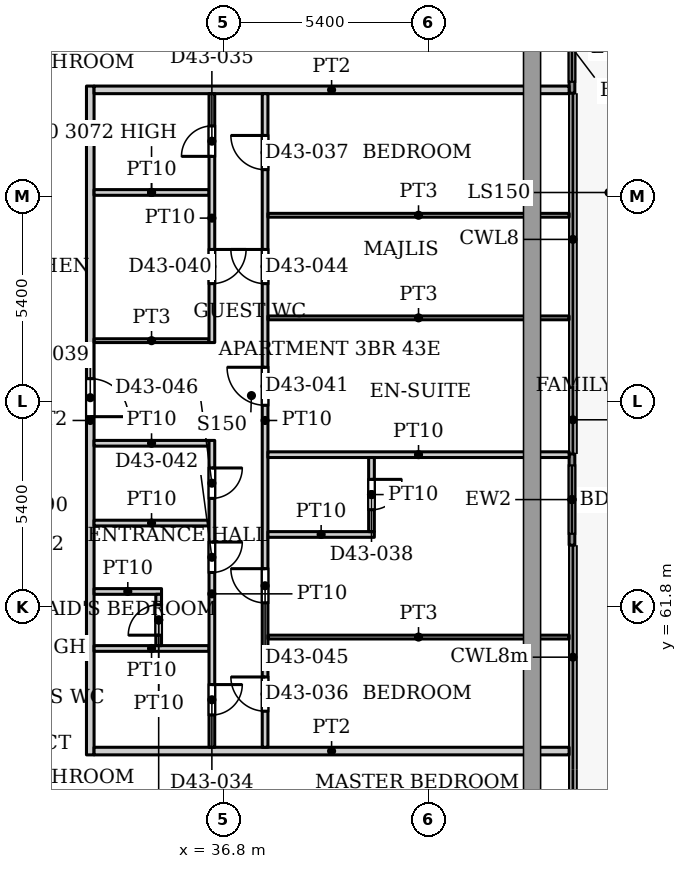
"""IFC4 building model, lengths in metres.
Left out: names, types, materials, properties, quantities, classifications, styles, units other than length and angle.
Written with IfcOpenShell. Run it as: python <this file> out.ifc"""

import sys

from ifc_helpers import new_model, si_unit, direction, frame, frame_2d, origin, place, context, subcontext, project, spatial, rectangle, extrude, source, transform, mapped, element, fill, save


model = new_model("IFC4")
c1 = context("Model", 3, precision=1e-05, world=origin(), true_north=direction((0.0, 1.0)))
c2 = subcontext(c1, "Body", "Model", "MODEL_VIEW")
j1 = project(units=[si_unit("LENGTHUNIT", "METRE"), si_unit("PLANEANGLEUNIT", "RADIAN")], contexts=[c1])
p1 = place(None, origin())
s1 = spatial("IfcSite", under=j1, at=p1, CompositionType="ELEMENT")
p2 = place(p1, origin())
s2 = spatial("IfcBuilding", under=s1, at=p2, CompositionType="ELEMENT")
p3 = place(p2, frame((0.0, 0.0, 183.8)))
s3 = spatial("IfcBuildingStorey", under=s2, at=p3, CompositionType="ELEMENT", Elevation=183.8)
p4 = place(p3, frame((45.975, 77.712, 0.0), z_axis=(0.0, 0.0, 1.0), x_axis=(0.0, -1.0, 0.0)))
e1 = element("IfcWall", 1, at=p4, inside=s3, PredefinedType="SOLIDWALL", context=c2, shape_type="SweptSolid", body=[
    extrude(rectangle(XDim=2.4, YDim=0.15, at=frame_2d((1.2, 0.0))), origin(), (0.0, 0.0, 1.0), 3.75),
])
p5 = place(p4, frame((0.3, 0.0, 0.0)))
e2 = element("IfcOpeningElement", 2, at=p5, cuts=e1, PredefinedType="OPENING", context=c2, shape_type="SweptSolid", body=[
    extrude(rectangle(XDim=1.8, YDim=2.4, at=frame_2d((0.9, 1.2))), frame((0.0, 0.085, 0.0), z_axis=(0.0, -1.0, 0.0), x_axis=(1.0, 0.0, 0.0)), (0.0, 0.0, 1.0), 0.17),
])
p6 = place(p3, frame((45.975, 65.818, 0.0), z_axis=(0.0, 0.0, 1.0), x_axis=(0.0, -1.0, 0.0)))
e3 = element("IfcWall", 3, at=p6, inside=s3, PredefinedType="SOLIDWALL", context=c2, shape_type="SweptSolid", body=[
    extrude(rectangle(XDim=2.4, YDim=0.15, at=frame_2d((1.2, 0.0))), origin(), (0.0, 0.0, 1.0), 3.75),
])
p7 = place(p6, frame((0.3, 0.0, 0.0)))
e4 = element("IfcOpeningElement", 4, at=p7, cuts=e3, PredefinedType="OPENING", context=c2, shape_type="SweptSolid", body=[
    extrude(rectangle(XDim=1.8, YDim=2.4, at=frame_2d((0.9, 1.2))), frame((0.0, 0.085, 0.0), z_axis=(0.0, -1.0, 0.0), x_axis=(1.0, 0.0, 0.0)), (0.0, 0.0, 1.0), 0.17),
])
p8 = place(p3, frame((33.3, 57.9, 0.0), z_axis=(0.0, 0.0, 1.0), x_axis=(0.0, 1.0, 0.0)))
e5 = element("IfcWall", 5, at=p8, inside=s3, PredefinedType="PARTITIONING", context=c2, shape_type="SweptSolid", body=[
    extrude(rectangle(XDim=17.6, YDim=0.2, at=frame_2d((8.8, 0.0))), origin(), (0.0, 0.0, 1.0), 3.6),
])
p9 = place(p8, frame((8.9, 0.0, 0.0)))
e6 = element("IfcOpeningElement", 6, at=p9, cuts=e5, PredefinedType="OPENING", context=c2, shape_type="SweptSolid", body=[
    extrude(rectangle(XDim=1.0, YDim=2.1, at=frame_2d((0.5, 1.05))), frame((0.0, 0.11, 0.0), z_axis=(0.0, -1.0, 0.0), x_axis=(1.0, 0.0, 0.0)), (0.0, 0.0, 1.0), 0.22),
])
p10 = place(p3, frame((33.4, 58.0, 0.0), z_axis=(0.0, 0.0, 1.0), x_axis=(1.0, 0.0, 0.0)))
e7 = element("IfcWall", 7, at=p10, inside=s3, PredefinedType="PARTITIONING", context=c2, shape_type="SweptSolid", body=[
    extrude(rectangle(XDim=12.5, YDim=0.2, at=frame_2d((6.25, 0.0))), origin(), (0.0, 0.0, 1.0), 3.6),
])
p11 = place(p3, frame((33.4, 60.7, 0.0), z_axis=(0.0, 0.0, 1.0), x_axis=(1.0, 0.0, 0.0)))
e8 = element("IfcWall", 8, at=p11, inside=s3, PredefinedType="PARTITIONING", context=c2, shape_type="SweptSolid", body=[
    extrude(rectangle(XDim=3.025, YDim=0.15, at=frame_2d((1.513, 0.0))), origin(), (0.0, 0.0, 1.0), 3.6),
])
p12 = place(p3, frame((33.4, 62.2, 0.0), z_axis=(0.0, 0.0, 1.0), x_axis=(1.0, 0.0, 0.0)))
e9 = element("IfcWall", 9, at=p12, inside=s3, PredefinedType="PARTITIONING", context=c2, shape_type="SweptSolid", body=[
    extrude(rectangle(XDim=1.775, YDim=0.15, at=frame_2d((0.888, 0.0))), origin(), (0.0, 0.0, 1.0), 3.6),
])
for number, where, z_axis, x_axis in (
    (10, (33.4, 64.0, 0.0), (0.0, 0.0, 1.0), (1.0, 0.0, 0.0)),
    (11, (33.4, 66.1, 0.0), (0.0, 0.0, 1.0), (1.0, 0.0, 0.0)),
):
    element("IfcWall", number, at=place(p3, frame(where, z_axis=z_axis, x_axis=x_axis)), inside=s3, PredefinedType="PARTITIONING", context=c2, shape_type="SweptSolid", body=[
        extrude(rectangle(XDim=3.025, YDim=0.15, at=frame_2d((1.513, 0.0))), origin(), (0.0, 0.0, 1.0), 3.6),
    ])
p13 = place(p3, frame((33.4, 68.8, 0.0), z_axis=(0.0, 0.0, 1.0), x_axis=(1.0, 0.0, 0.0)))
e12 = element("IfcWall", 12, at=p13, inside=s3, PredefinedType="PARTITIONING", context=c2, shape_type="SweptSolid", body=[
    extrude(rectangle(XDim=3.025, YDim=0.1, at=frame_2d((1.513, 0.0))), origin(), (0.0, 0.0, 1.0), 3.6),
])
p14 = place(p3, frame((33.4, 72.7, 0.0), z_axis=(0.0, 0.0, 1.0), x_axis=(1.0, 0.0, 0.0)))
e13 = element("IfcWall", 13, at=p14, inside=s3, PredefinedType="PARTITIONING", context=c2, shape_type="SweptSolid", body=[
    extrude(rectangle(XDim=3.025, YDim=0.15, at=frame_2d((1.513, 0.0))), origin(), (0.0, 0.0, 1.0), 3.072),
])
p15 = place(p3, frame((33.4, 75.4, 0.0), z_axis=(0.0, 0.0, 1.0), x_axis=(1.0, 0.0, 0.0)))
e14 = element("IfcWall", 14, at=p15, inside=s3, PredefinedType="PARTITIONING", context=c2, shape_type="SweptSolid", body=[
    extrude(rectangle(XDim=12.5, YDim=0.2, at=frame_2d((6.25, 0.0))), origin(), (0.0, 0.0, 1.0), 3.6),
])
p16 = place(p3, frame((35.1, 60.775, 0.0), z_axis=(0.0, 0.0, 1.0), x_axis=(0.0, 1.0, 0.0)))
e15 = element("IfcWall", 15, at=p16, inside=s3, PredefinedType="PARTITIONING", context=c2, shape_type="SweptSolid", body=[
    extrude(rectangle(XDim=1.35, YDim=0.15, at=frame_2d((0.675, 0.0))), origin(), (0.0, 0.0, 1.0), 3.6),
])
p17 = place(p16, frame((0.275, 0.0, 0.0)))
e16 = element("IfcOpeningElement", 16, at=p17, cuts=e15, PredefinedType="OPENING", context=c2, shape_type="SweptSolid", body=[
    extrude(rectangle(XDim=0.8, YDim=2.1, at=frame_2d((0.4, 1.05))), frame((0.0, 0.085, 0.0), z_axis=(0.0, -1.0, 0.0), x_axis=(1.0, 0.0, 0.0)), (0.0, 0.0, 1.0), 0.17),
])
p18 = place(p3, frame((36.5, 58.1, 0.0), z_axis=(0.0, 0.0, 1.0), x_axis=(0.0, 1.0, 0.0)))
e17 = element("IfcWall", 17, at=p18, inside=s3, PredefinedType="PARTITIONING", context=c2, shape_type="SweptSolid", body=[
    extrude(rectangle(XDim=8.075, YDim=0.15, at=frame_2d((4.038, 0.0))), origin(), (0.0, 0.0, 1.0), 3.6),
])
p19 = place(p18, frame((0.85, 0.0, 0.0)))
e18 = element("IfcOpeningElement", 18, at=p19, cuts=e17, PredefinedType="OPENING", context=c2, shape_type="SweptSolid", body=[
    extrude(rectangle(XDim=0.8, YDim=2.1, at=frame_2d((0.4, 1.05))), frame((0.0, 0.085, 0.0), z_axis=(0.0, -1.0, 0.0), x_axis=(1.0, 0.0, 0.0)), (0.0, 0.0, 1.0), 0.17),
])
p20 = place(p18, frame((4.6, 0.0, 0.0)))
e19 = element("IfcOpeningElement", 19, at=p20, cuts=e17, PredefinedType="OPENING", context=c2, shape_type="SweptSolid", body=[
    extrude(rectangle(XDim=0.8, YDim=2.1, at=frame_2d((0.4, 1.05))), frame((0.0, 0.085, 0.0), z_axis=(0.0, -1.0, 0.0), x_axis=(1.0, 0.0, 0.0)), (0.0, 0.0, 1.0), 0.17),
])
p21 = place(p18, frame((6.55, 0.0, 0.0)))
e20 = element("IfcOpeningElement", 20, at=p21, cuts=e17, PredefinedType="OPENING", context=c2, shape_type="SweptSolid", body=[
    extrude(rectangle(XDim=0.8, YDim=2.1, at=frame_2d((0.4, 1.05))), frame((0.0, 0.085, 0.0), z_axis=(0.0, -1.0, 0.0), x_axis=(1.0, 0.0, 0.0)), (0.0, 0.0, 1.0), 0.17),
])
p22 = place(p3, frame((36.5, 68.75, 0.0), z_axis=(0.0, 0.0, 1.0), x_axis=(0.0, 1.0, 0.0)))
e21 = element("IfcWall", 21, at=p22, inside=s3, PredefinedType="PARTITIONING", context=c2, shape_type="SweptSolid", body=[
    extrude(rectangle(XDim=6.55, YDim=0.15, at=frame_2d((3.275, 0.0))), origin(), (0.0, 0.0, 1.0), 3.6),
])
p23 = place(p22, frame((4.9, 0.0, 0.0)))
e22 = element("IfcOpeningElement", 22, at=p23, cuts=e21, PredefinedType="OPENING", context=c2, shape_type="SweptSolid", body=[
    extrude(rectangle(XDim=0.8, YDim=2.1, at=frame_2d((0.4, 1.05))), frame((0.0, 0.085, 0.0), z_axis=(0.0, -1.0, 0.0), x_axis=(1.0, 0.0, 0.0)), (0.0, 0.0, 1.0), 0.17),
])
p24 = place(p22, frame((1.55, 0.0, 0.0)))
e23 = element("IfcOpeningElement", 23, at=p24, cuts=e21, PredefinedType="OPENING", context=c2, shape_type="SweptSolid", body=[
    extrude(rectangle(XDim=0.9, YDim=2.1, at=frame_2d((0.45, 1.05))), frame((0.0, 0.085, 0.0), z_axis=(0.0, -1.0, 0.0), x_axis=(1.0, 0.0, 0.0)), (0.0, 0.0, 1.0), 0.17),
])
p25 = place(p3, frame((37.9, 58.1, 0.0), z_axis=(0.0, 0.0, 1.0), x_axis=(0.0, 1.0, 0.0)))
e24 = element("IfcWall", 24, at=p25, inside=s3, PredefinedType="PARTITIONING", context=c2, shape_type="SweptSolid", body=[
    extrude(rectangle(XDim=17.2, YDim=0.15, at=frame_2d((8.6, 0.0))), origin(), (0.0, 0.0, 1.0), 3.6),
])
p26 = place(p25, frame((0.95, 0.0, 0.0)))
e25 = element("IfcOpeningElement", 25, at=p26, cuts=e24, PredefinedType="OPENING", context=c2, shape_type="SweptSolid", body=[
    extrude(rectangle(XDim=0.9, YDim=2.1, at=frame_2d((0.45, 1.05))), frame((0.0, 0.085, 0.0), z_axis=(0.0, -1.0, 0.0), x_axis=(1.0, 0.0, 0.0)), (0.0, 0.0, 1.0), 0.17),
])
p27 = place(p25, frame((15.2, 0.0, 0.0)))
e26 = element("IfcOpeningElement", 26, at=p27, cuts=e24, PredefinedType="OPENING", context=c2, shape_type="SweptSolid", body=[
    extrude(rectangle(XDim=0.9, YDim=2.1, at=frame_2d((0.45, 1.05))), frame((0.0, 0.085, 0.0), z_axis=(0.0, -1.0, 0.0), x_axis=(1.0, 0.0, 0.0)), (0.0, 0.0, 1.0), 0.17),
])
p28 = place(p25, frame((9.0, 0.0, 0.0)))
e27 = element("IfcOpeningElement", 27, at=p28, cuts=e24, PredefinedType="OPENING", context=c2, shape_type="SweptSolid", body=[
    extrude(rectangle(XDim=1.0, YDim=2.1, at=frame_2d((0.5, 1.05))), frame((0.0, 0.085, 0.0), z_axis=(0.0, -1.0, 0.0), x_axis=(1.0, 0.0, 0.0)), (0.0, 0.0, 1.0), 0.17),
])
p29 = place(p25, frame((12.2, 0.0, 0.0)))
e28 = element("IfcOpeningElement", 28, at=p29, cuts=e24, PredefinedType="OPENING", context=c2, shape_type="SweptSolid", body=[
    extrude(rectangle(XDim=0.9, YDim=2.1, at=frame_2d((0.45, 1.05))), frame((0.0, 0.085, 0.0), z_axis=(0.0, -1.0, 0.0), x_axis=(1.0, 0.0, 0.0)), (0.0, 0.0, 1.0), 0.17),
])
p30 = place(p25, frame((3.8, 0.0, 0.0)))
e29 = element("IfcOpeningElement", 29, at=p30, cuts=e24, PredefinedType="OPENING", context=c2, shape_type="SweptSolid", body=[
    extrude(rectangle(XDim=0.9, YDim=2.1, at=frame_2d((0.45, 1.05))), frame((0.0, 0.085, 0.0), z_axis=(0.0, -1.0, 0.0), x_axis=(1.0, 0.0, 0.0)), (0.0, 0.0, 1.0), 0.17),
])
p31 = place(p3, frame((37.975, 61.0, 0.0), z_axis=(0.0, 0.0, 1.0), x_axis=(1.0, 0.0, 0.0)))
e30 = element("IfcWall", 30, at=p31, inside=s3, PredefinedType="PARTITIONING", context=c2, shape_type="SweptSolid", body=[
    extrude(rectangle(XDim=7.925, YDim=0.1, at=frame_2d((3.962, 0.0))), origin(), (0.0, 0.0, 1.0), 3.6),
])
p32 = place(p3, frame((37.975, 63.7, 0.0), z_axis=(0.0, 0.0, 1.0), x_axis=(1.0, 0.0, 0.0)))
e31 = element("IfcWall", 31, at=p32, inside=s3, PredefinedType="PARTITIONING", context=c2, shape_type="SweptSolid", body=[
    extrude(rectangle(XDim=2.8, YDim=0.15, at=frame_2d((1.4, 0.0))), origin(), (0.0, 0.0, 1.0), 3.6),
])
p33 = place(p3, frame((37.975, 65.8, 0.0), z_axis=(0.0, 0.0, 1.0), x_axis=(1.0, 0.0, 0.0)))
e32 = element("IfcWall", 32, at=p33, inside=s3, PredefinedType="PARTITIONING", context=c2, shape_type="SweptSolid", body=[
    extrude(rectangle(XDim=7.925, YDim=0.15, at=frame_2d((3.962, 0.0))), origin(), (0.0, 0.0, 1.0), 3.6),
])
for number, where, z_axis, x_axis in (
    (33, (37.975, 69.4, 0.0), (0.0, 0.0, 1.0), (1.0, 0.0, 0.0)),
    (34, (37.975, 72.1, 0.0), (0.0, 0.0, 1.0), (1.0, 0.0, 0.0)),
):
    element("IfcWall", number, at=place(p3, frame(where, z_axis=z_axis, x_axis=x_axis)), inside=s3, PredefinedType="PARTITIONING", context=c2, shape_type="SweptSolid", body=[
        extrude(rectangle(XDim=7.925, YDim=0.1, at=frame_2d((3.962, 0.0))), origin(), (0.0, 0.0, 1.0), 3.6),
    ])
p34 = place(p3, frame((40.7, 63.775, 0.0), z_axis=(0.0, 0.0, 1.0), x_axis=(0.0, 1.0, 0.0)))
e35 = element("IfcWall", 35, at=p34, inside=s3, PredefinedType="PARTITIONING", context=c2, shape_type="SweptSolid", body=[
    extrude(rectangle(XDim=1.95, YDim=0.15, at=frame_2d((0.975, 0.0))), origin(), (0.0, 0.0, 1.0), 3.6),
])
p35 = place(p34, frame((0.575, 0.0, 0.0)))
e36 = element("IfcOpeningElement", 36, at=p35, cuts=e35, PredefinedType="OPENING", context=c2, shape_type="SweptSolid", body=[
    extrude(rectangle(XDim=0.8, YDim=2.1, at=frame_2d((0.4, 1.05))), frame((0.0, 0.085, 0.0), z_axis=(0.0, -1.0, 0.0), x_axis=(1.0, 0.0, 0.0)), (0.0, 0.0, 1.0), 0.17),
])
m1 = source(origin(), c2, "Body", "SweptSolid", [
    extrude(rectangle(XDim=1.8, YDim=2.4, at=frame_2d((0.9, 1.2))), frame((0.0, 0.025, 0.0), z_axis=(0.0, -1.0, 0.0), x_axis=(1.0, 0.0, 0.0)), (0.0, 0.0, 1.0), 0.05),
])
p36 = place(p5, origin())
e37 = element("IfcDoor", 37, at=p36, inside=s3, OperationType="SLIDING_TO_LEFT", PredefinedType="DOOR", context=c2, shape_type="MappedRepresentation", body=[
    mapped(m1, transform((0.0, 0.0, 0.0), x_axis=(1.0, 0.0, 0.0), y_axis=(0.0, 1.0, 0.0), z_axis=(0.0, 0.0, 1.0), scale=1.0)),
])
fill(e2, e37)
p37 = place(p7, origin())
e38 = element("IfcDoor", 38, at=p37, inside=s3, OperationType="SLIDING_TO_LEFT", PredefinedType="DOOR", context=c2, shape_type="MappedRepresentation", body=[
    mapped(m1, transform((0.0, 0.0, 0.0), x_axis=(1.0, 0.0, 0.0), y_axis=(0.0, 1.0, 0.0), z_axis=(0.0, 0.0, 1.0), scale=1.0)),
])
fill(e4, e38)
m2 = source(origin(), c2, "Body", "SweptSolid", [
    extrude(rectangle(XDim=0.8, YDim=2.1, at=frame_2d((0.4, 1.05))), frame((0.0, 0.025, 0.0), z_axis=(0.0, -1.0, 0.0), x_axis=(1.0, 0.0, 0.0)), (0.0, 0.0, 1.0), 0.05),
])
p38 = place(p19, origin())
e39 = element("IfcDoor", 39, at=p38, inside=s3, OperationType="SINGLE_SWING_RIGHT", PredefinedType="DOOR", context=c2, shape_type="MappedRepresentation", body=[
    mapped(m2, transform((0.0, 0.0, 0.0), x_axis=(1.0, 0.0, 0.0), y_axis=(0.0, 1.0, 0.0), z_axis=(0.0, 0.0, 1.0), scale=1.0)),
])
fill(e18, e39)
p39 = place(p23, origin())
e40 = element("IfcDoor", 40, at=p39, inside=s3, OperationType="SINGLE_SWING_LEFT", PredefinedType="DOOR", context=c2, shape_type="MappedRepresentation", body=[
    mapped(m2, transform((0.0, 0.0, 0.0), x_axis=(1.0, 0.0, 0.0), y_axis=(0.0, 1.0, 0.0), z_axis=(0.0, 0.0, 1.0), scale=1.0)),
])
fill(e22, e40)
m3 = source(origin(), c2, "Body", "SweptSolid", [
    extrude(rectangle(XDim=0.9, YDim=2.1, at=frame_2d((0.45, 1.05))), frame((0.0, 0.025, 0.0), z_axis=(0.0, -1.0, 0.0), x_axis=(1.0, 0.0, 0.0)), (0.0, 0.0, 1.0), 0.05),
])
p40 = place(p26, origin())
e41 = element("IfcDoor", 41, at=p40, inside=s3, OperationType="SINGLE_SWING_LEFT", PredefinedType="DOOR", context=c2, shape_type="MappedRepresentation", body=[
    mapped(m3, transform((0.0, 0.0, 0.0), x_axis=(1.0, 0.0, 0.0), y_axis=(0.0, 1.0, 0.0), z_axis=(0.0, 0.0, 1.0), scale=1.0)),
])
fill(e25, e41)
p41 = place(p27, origin())
e42 = element("IfcDoor", 42, at=p41, inside=s3, OperationType="SINGLE_SWING_LEFT", PredefinedType="DOOR", context=c2, shape_type="MappedRepresentation", body=[
    mapped(m3, transform((0.0, 0.0, 0.0), x_axis=(1.0, 0.0, 0.0), y_axis=(0.0, 1.0, 0.0), z_axis=(0.0, 0.0, 1.0), scale=1.0)),
])
fill(e26, e42)
p42 = place(p35, origin())
e43 = element("IfcDoor", 43, at=p42, inside=s3, OperationType="SINGLE_SWING_RIGHT", PredefinedType="DOOR", context=c2, shape_type="MappedRepresentation", body=[
    mapped(m2, transform((0.0, 0.0, 0.0), x_axis=(1.0, 0.0, 0.0), y_axis=(0.0, 1.0, 0.0), z_axis=(0.0, 0.0, 1.0), scale=1.0)),
])
fill(e36, e43)
m4 = source(origin(), c2, "Body", "SweptSolid", [
    extrude(rectangle(XDim=1.0, YDim=2.1, at=frame_2d((0.5, 1.05))), frame((0.0, 0.025, 0.0), z_axis=(0.0, -1.0, 0.0), x_axis=(1.0, 0.0, 0.0)), (0.0, 0.0, 1.0), 0.05),
])
p43 = place(p9, origin())
e44 = element("IfcDoor", 44, at=p43, inside=s3, OperationType="SINGLE_SWING_RIGHT", PredefinedType="DOOR", context=c2, shape_type="MappedRepresentation", body=[
    mapped(m4, transform((0.0, 0.0, 0.0), x_axis=(1.0, 0.0, 0.0), y_axis=(0.0, 1.0, 0.0), z_axis=(0.0, 0.0, 1.0), scale=1.0)),
])
fill(e6, e44)
p44 = place(p24, origin())
e45 = element("IfcDoor", 45, at=p44, inside=s3, OperationType="SINGLE_SWING_RIGHT", PredefinedType="DOOR", context=c2, shape_type="MappedRepresentation", body=[
    mapped(m3, transform((0.0, 0.0, 0.0), x_axis=(1.0, 0.0, 0.0), y_axis=(0.0, 1.0, 0.0), z_axis=(0.0, 0.0, 1.0), scale=1.0)),
])
fill(e23, e45)
m5 = source(origin(), c2, "Body", "SweptSolid", [
    extrude(rectangle(XDim=1.0, YDim=2.1, at=frame_2d((0.5, 1.05))), frame((0.0, 0.025, 0.0), z_axis=(0.0, -1.0, 0.0), x_axis=(1.0, 0.0, 0.0)), (0.0, 0.0, 1.0), 0.05),
])
p45 = place(p28, origin())
e46 = element("IfcDoor", 46, at=p45, inside=s3, OperationType="SINGLE_SWING_LEFT", PredefinedType="DOOR", context=c2, shape_type="MappedRepresentation", body=[
    mapped(m5, transform((0.0, 0.0, 0.0), x_axis=(1.0, 0.0, 0.0), y_axis=(0.0, 1.0, 0.0), z_axis=(0.0, 0.0, 1.0), scale=1.0)),
])
fill(e27, e46)
p46 = place(p20, origin())
e47 = element("IfcDoor", 47, at=p46, inside=s3, OperationType="SINGLE_SWING_RIGHT", PredefinedType="DOOR", context=c2, shape_type="MappedRepresentation", body=[
    mapped(m2, transform((0.0, 0.0, 0.0), x_axis=(1.0, 0.0, 0.0), y_axis=(0.0, 1.0, 0.0), z_axis=(0.0, 0.0, 1.0), scale=1.0)),
])
fill(e19, e47)
p47 = place(p17, origin())
e48 = element("IfcDoor", 48, at=p47, inside=s3, OperationType="SINGLE_SWING_LEFT", PredefinedType="DOOR", context=c2, shape_type="MappedRepresentation", body=[
    mapped(m2, transform((0.0, 0.0, 0.0), x_axis=(1.0, 0.0, 0.0), y_axis=(0.0, 1.0, 0.0), z_axis=(0.0, 0.0, 1.0), scale=1.0)),
])
fill(e16, e48)
p48 = place(p29, origin())
e49 = element("IfcDoor", 49, at=p48, inside=s3, OperationType="SINGLE_SWING_LEFT", PredefinedType="DOOR", context=c2, shape_type="MappedRepresentation", body=[
    mapped(m3, transform((0.0, 0.0, 0.0), x_axis=(1.0, 0.0, 0.0), y_axis=(0.0, 1.0, 0.0), z_axis=(0.0, 0.0, 1.0), scale=1.0)),
])
fill(e28, e49)
p49 = place(p30, origin())
e50 = element("IfcDoor", 50, at=p49, inside=s3, OperationType="SINGLE_SWING_LEFT", PredefinedType="DOOR", context=c2, shape_type="MappedRepresentation", body=[
    mapped(m3, transform((0.0, 0.0, 0.0), x_axis=(1.0, 0.0, 0.0), y_axis=(0.0, 1.0, 0.0), z_axis=(0.0, 0.0, 1.0), scale=1.0)),
])
fill(e29, e50)
p50 = place(p21, origin())
e51 = element("IfcDoor", 51, at=p50, inside=s3, OperationType="SINGLE_SWING_RIGHT", PredefinedType="DOOR", context=c2, shape_type="MappedRepresentation", body=[
    mapped(m2, transform((0.0, 0.0, 0.0), x_axis=(1.0, 0.0, 0.0), y_axis=(0.0, 1.0, 0.0), z_axis=(0.0, 0.0, 1.0), scale=1.0)),
])
fill(e20, e51)
save(model, sys.argv[1])
